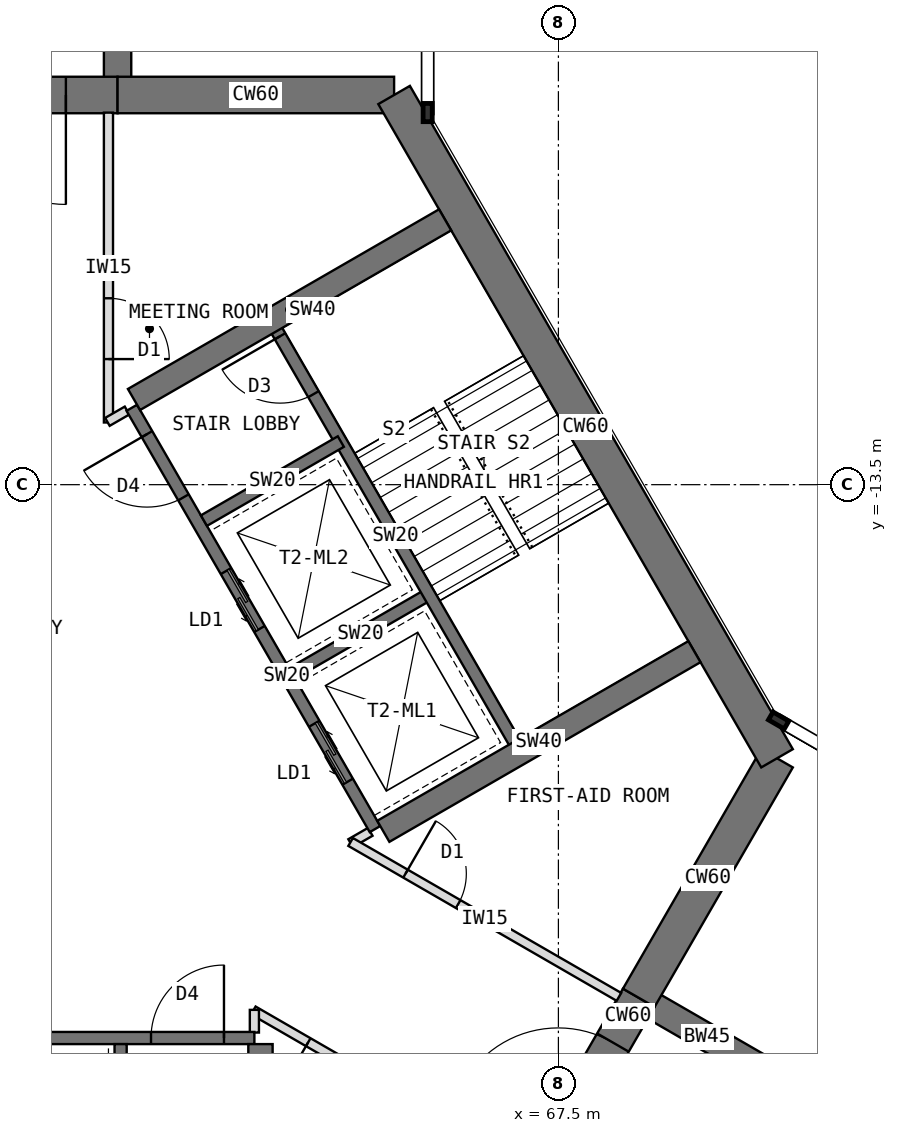
"""IFC4 building model, lengths in metres.
Left out: names, types, materials, properties, quantities, classifications, styles, units other than length and angle.
Written with IfcOpenShell. Run it as: python <this file> out.ifc"""

import sys

from ifc_helpers import new_model, si_unit, direction, frame, frame_2d, origin, place, context, subcontext, project, spatial, rectangle, extrude, element, fill, save


model = new_model("IFC4")
c1 = context("Model", 3, precision=1e-05, world=origin(), true_north=direction((0.0, 1.0)))
c2 = subcontext(c1, "Body", "Model", "MODEL_VIEW")
j1 = project(units=[si_unit("LENGTHUNIT", "METRE"), si_unit("PLANEANGLEUNIT", "RADIAN")], contexts=[c1])
p1 = place(None, origin())
s1 = spatial("IfcSite", under=j1, at=p1, CompositionType="ELEMENT")
p2 = place(p1, origin())
s2 = spatial("IfcBuilding", under=s1, at=p2, CompositionType="ELEMENT")
p3 = place(p2, frame((0.0, 0.0, 97.5)))
s3 = spatial("IfcBuildingStorey", under=s2, at=p3, CompositionType="ELEMENT", Elevation=97.5)
p4 = place(p3, frame((64.798, -7.092, 0.0), z_axis=(0.0, 0.0, 1.0), x_axis=(-1.0, 0.0, 0.0)))
e1 = element("IfcWall", 1, at=p4, inside=s3, PredefinedType="SHEAR", context=c2, shape_type="SweptSolid", body=[
    extrude(rectangle(XDim=4.548, YDim=0.6, at=frame_2d((2.274, 0.0))), origin(), (0.0, 0.0, 1.0), 4.0),
])
p5 = place(p3, frame((60.25, -7.092, 0.0), z_axis=(0.0, 0.0, 1.0), x_axis=(-1.0, 0.0, 0.0)))
e2 = element("IfcWall", 2, at=p5, inside=s3, PredefinedType="SHEAR", context=c2, shape_type="SweptSolid", body=[
    extrude(rectangle(XDim=3.5, YDim=0.6, at=frame_2d((1.75, 0.0))), origin(), (0.0, 0.0, 1.0), 4.0),
])
p6 = place(p5, frame((0.85, 0.0, 0.0)))
e3 = element("IfcOpeningElement", 3, at=p6, cuts=e2, PredefinedType="OPENING", context=c2, shape_type="SweptSolid", body=[
    extrude(rectangle(XDim=1.8, YDim=2.1, at=frame_2d((0.9, 1.05))), frame((0.0, 0.31, 0.0), z_axis=(0.0, -1.0, 0.0), x_axis=(1.0, 0.0, 0.0)), (0.0, 0.0, 1.0), 0.62),
])
p7 = place(p3, frame((67.072, -24.97, 0.0), z_axis=(0.0, 0.0, 1.0), x_axis=(0.500010275428, 0.866019471182, 0.0)))
e4 = element("IfcWall", 4, at=p7, inside=s3, PredefinedType="SHEAR", context=c2, shape_type="SweptSolid", body=[
    extrude(rectangle(XDim=3.5, YDim=0.6, at=frame_2d((1.75, 0.0))), origin(), (0.0, 0.0, 1.0), 4.0),
])
p8 = place(p7, frame((0.85, 0.0, 0.0)))
e5 = element("IfcOpeningElement", 5, at=p8, cuts=e4, PredefinedType="OPENING", context=c2, shape_type="SweptSolid", body=[
    extrude(rectangle(XDim=1.8, YDim=2.1, at=frame_2d((0.9, 1.05))), frame((0.0, 0.31, 0.0), z_axis=(0.0, -1.0, 0.0), x_axis=(1.0, 0.0, 0.0)), (0.0, 0.0, 1.0), 0.62),
])
p9 = place(p3, frame((68.822, -21.939, 0.0), z_axis=(0.0, 0.0, 1.0), x_axis=(0.500024481964, 0.866011268655, 0.0)))
e6 = element("IfcWall", 6, at=p9, inside=s3, PredefinedType="SHEAR", context=c2, shape_type="SweptSolid", body=[
    extrude(rectangle(XDim=4.548, YDim=0.6, at=frame_2d((2.274, 0.0))), origin(), (0.0, 0.0, 1.0), 4.0),
])
p10 = place(p3, frame((71.096, -18.0, 0.0), z_axis=(0.0, 0.0, 1.0), x_axis=(-0.500005998175, 0.866021940709, 0.0)))
e7 = element("IfcWall", 7, at=p10, inside=s3, PredefinedType="SHEAR", context=c2, shape_type="SweptSolid", body=[
    extrude(rectangle(XDim=12.596, YDim=0.6, at=frame_2d((6.298, 0.0))), origin(), (0.0, 0.0, 1.0), 4.0),
])
p11 = place(p3, frame((60.25, -7.092, 0.0), z_axis=(0.0, 0.0, 1.0), x_axis=(0.0, 1.0, 0.0)))
e8 = element("IfcWall", 8, at=p11, inside=s3, PredefinedType="SHEAR", context=c2, shape_type="SweptSolid", body=[
    extrude(rectangle(XDim=2.592, YDim=0.45, at=frame_2d((1.296, 0.0))), origin(), (0.0, 0.0, 1.0), 4.0),
])
p12 = place(p3, frame((68.822, -21.939, 0.0), z_axis=(0.0, 0.0, 1.0), x_axis=(0.866072649678, -0.499918158782, 0.0)))
e9 = element("IfcWall", 9, at=p12, inside=s3, PredefinedType="SHEAR", context=c2, shape_type="SweptSolid", body=[
    extrude(rectangle(XDim=2.592, YDim=0.45, at=frame_2d((1.296, 0.0))), origin(), (0.0, 0.0, 1.0), 4.0),
])
p13 = place(p3, frame((54.5, -22.6, 0.0), z_axis=(0.0, 0.0, 1.0), x_axis=(1.0, 0.0, 0.0)))
e10 = element("IfcWall", 10, at=p13, inside=s3, PredefinedType="SHEAR", context=c2, shape_type="SweptSolid", body=[
    extrude(rectangle(XDim=8.0, YDim=0.2, at=frame_2d((4.0, 0.0))), origin(), (0.0, 0.0, 1.0), 4.0),
])
p14 = place(p13, frame((6.3, 0.0, 0.0)))
e11 = element("IfcOpeningElement", 11, at=p14, cuts=e10, PredefinedType="OPENING", context=c2, shape_type="SweptSolid", body=[
    extrude(rectangle(XDim=1.2, YDim=2.1, at=frame_2d((0.6, 1.05))), frame((0.0, 0.11, 0.0), z_axis=(0.0, -1.0, 0.0), x_axis=(1.0, 0.0, 0.0)), (0.0, 0.0, 1.0), 0.22),
])
p15 = place(p13, frame((0.9, 0.0, 0.0)))
e12 = element("IfcOpeningElement", 12, at=p15, cuts=e10, PredefinedType="OPENING", context=c2, shape_type="SweptSolid", body=[
    extrude(rectangle(XDim=1.1, YDim=2.2, at=frame_2d((0.55, 1.1))), frame((0.0, 0.11, 0.0), z_axis=(0.0, -1.0, 0.0), x_axis=(1.0, 0.0, 0.0)), (0.0, 0.0, 1.0), 0.22),
])
p16 = place(p3, frame((60.3, -22.7, 0.0), z_axis=(0.0, 0.0, 1.0), x_axis=(0.0, -1.0, 0.0)))
e13 = element("IfcWall", 13, at=p16, inside=s3, PredefinedType="SHEAR", context=c2, shape_type="SweptSolid", body=[
    extrude(rectangle(XDim=2.6, YDim=0.2, at=frame_2d((1.3, 0.0))), origin(), (0.0, 0.0, 1.0), 4.0),
])
p17 = place(p16, frame((0.55, 0.0, 0.0)))
e14 = element("IfcOpeningElement", 14, at=p17, cuts=e13, PredefinedType="OPENING", context=c2, shape_type="SweptSolid", body=[
    extrude(rectangle(XDim=1.3, YDim=2.2, at=frame_2d((0.65, 1.1))), frame((0.0, 0.11, 0.0), z_axis=(0.0, -1.0, 0.0), x_axis=(1.0, 0.0, 0.0)), (0.0, 0.0, 1.0), 0.22),
])
p18 = place(p3, frame((62.6, -22.7, 0.0), z_axis=(0.0, 0.0, 1.0), x_axis=(0.0, -1.0, 0.0)))
e15 = element("IfcWall", 15, at=p18, inside=s3, PredefinedType="SHEAR", context=c2, shape_type="SweptSolid", body=[
    extrude(rectangle(XDim=5.908, YDim=0.4, at=frame_2d((2.954, 0.0))), origin(), (0.0, 0.0, 1.0), 4.0),
])
p19 = place(p3, frame((64.484, -19.164, 0.0), z_axis=(0.0, 0.0, 1.0), x_axis=(-0.49999894854, 0.866026010844, 0.0)))
e16 = element("IfcWall", 16, at=p19, inside=s3, PredefinedType="SHEAR", context=c2, shape_type="SweptSolid", body=[
    extrude(rectangle(XDim=8.0, YDim=0.2, at=frame_2d((4.0, 0.0))), origin(), (0.0, 0.0, 1.0), 4.0),
])
p20 = place(p19, frame((6.3, 0.0, 0.0)))
e17 = element("IfcOpeningElement", 17, at=p20, cuts=e16, PredefinedType="OPENING", context=c2, shape_type="SweptSolid", body=[
    extrude(rectangle(XDim=1.2, YDim=2.1, at=frame_2d((0.6, 1.05))), frame((0.0, 0.11, 0.0), z_axis=(0.0, -1.0, 0.0), x_axis=(1.0, 0.0, 0.0)), (0.0, 0.0, 1.0), 0.22),
])
p21 = place(p19, frame((0.9, 0.0, 0.0)))
e18 = element("IfcOpeningElement", 18, at=p21, cuts=e16, PredefinedType="OPENING", context=c2, shape_type="SweptSolid", body=[
    extrude(rectangle(XDim=1.1, YDim=2.2, at=frame_2d((0.55, 1.1))), frame((0.0, 0.11, 0.0), z_axis=(0.0, -1.0, 0.0), x_axis=(1.0, 0.0, 0.0)), (0.0, 0.0, 1.0), 0.22),
])
p22 = place(p19, frame((3.8, 0.0, 0.0)))
e19 = element("IfcOpeningElement", 19, at=p22, cuts=e16, PredefinedType="OPENING", context=c2, shape_type="SweptSolid", body=[
    extrude(rectangle(XDim=1.1, YDim=2.2, at=frame_2d((0.55, 1.1))), frame((0.0, 0.11, 0.0), z_axis=(0.0, -1.0, 0.0), x_axis=(1.0, 0.0, 0.0)), (0.0, 0.0, 1.0), 0.22),
])
p23 = place(p3, frame((63.12, -16.603, 0.0), z_axis=(0.0, 0.0, 1.0), x_axis=(0.866062058628, 0.499936506574, 0.0)))
e20 = element("IfcWall", 20, at=p23, inside=s3, PredefinedType="SHEAR", context=c2, shape_type="SweptSolid", body=[
    extrude(rectangle(XDim=2.6, YDim=0.2, at=frame_2d((1.3, 0.0))), origin(), (0.0, 0.0, 1.0), 4.0),
])
p24 = place(p3, frame((61.67, -14.091, 0.0), z_axis=(0.0, 0.0, 1.0), x_axis=(0.86603858612, 0.49997716683, 0.0)))
e21 = element("IfcWall", 21, at=p24, inside=s3, PredefinedType="SHEAR", context=c2, shape_type="SweptSolid", body=[
    extrude(rectangle(XDim=2.6, YDim=0.2, at=frame_2d((1.3, 0.0))), origin(), (0.0, 0.0, 1.0), 4.0),
])
p25 = place(p3, frame((66.822, -17.814, 0.0), z_axis=(0.0, 0.0, 1.0), x_axis=(-0.49999894854, 0.866026010844, 0.0)))
e22 = element("IfcWall", 22, at=p25, inside=s3, PredefinedType="SHEAR", context=c2, shape_type="SweptSolid", body=[
    extrude(rectangle(XDim=8.0, YDim=0.2, at=frame_2d((4.0, 0.0))), origin(), (0.0, 0.0, 1.0), 4.0),
])
p26 = place(p25, frame((6.7, 0.0, 0.0)))
e23 = element("IfcOpeningElement", 23, at=p26, cuts=e22, PredefinedType="OPENING", context=c2, shape_type="SweptSolid", body=[
    extrude(rectangle(XDim=1.1, YDim=2.1, at=frame_2d((0.55, 1.05))), frame((0.0, 0.11, 0.0), z_axis=(0.0, -1.0, 0.0), x_axis=(1.0, 0.0, 0.0)), (0.0, 0.0, 1.0), 0.22),
])
p27 = place(p3, frame((60.52, -12.099, 0.0), z_axis=(0.0, 0.0, 1.0), x_axis=(0.866009424208, 0.500027676417, 0.0)))
e24 = element("IfcWall", 24, at=p27, inside=s3, PredefinedType="SHEAR", context=c2, shape_type="SweptSolid", body=[
    extrude(rectangle(XDim=5.908, YDim=0.4, at=frame_2d((2.954, 0.0))), origin(), (0.0, 0.0, 1.0), 4.0),
])
p28 = place(p3, frame((64.62, -19.201, 0.0), z_axis=(0.0, 0.0, 1.0), x_axis=(0.866027317282, 0.49999668571, 0.0)))
e25 = element("IfcWall", 25, at=p28, inside=s3, PredefinedType="SHEAR", context=c2, shape_type="SweptSolid", body=[
    extrude(rectangle(XDim=5.908, YDim=0.4, at=frame_2d((2.954, 0.0))), origin(), (0.0, 0.0, 1.0), 4.0),
])
p29 = place(p3, frame((60.1, -7.382, 0.0), z_axis=(0.0, 0.0, 1.0), x_axis=(0.0, -1.0, 0.0)))
e26 = element("IfcWall", 26, at=p29, inside=s3, PredefinedType="PARTITIONING", context=c2, shape_type="SweptSolid", body=[
    extrude(rectangle(XDim=5.096, YDim=0.15, at=frame_2d((2.548, 0.0))), origin(), (0.0, 0.0, 1.0), 3.8),
])
p30 = place(p29, frame((3.053, 0.0, 0.0)))
e27 = element("IfcOpeningElement", 27, at=p30, cuts=e26, PredefinedType="OPENING", context=c2, shape_type="SweptSolid", body=[
    extrude(rectangle(XDim=1.0, YDim=2.1, at=frame_2d((0.5, 1.05))), frame((0.0, 0.085, 0.0), z_axis=(0.0, -1.0, 0.0), x_axis=(1.0, 0.0, 0.0)), (0.0, 0.0, 1.0), 0.17),
])
p31 = place(p3, frame((60.083, -12.467, 0.0), z_axis=(0.0, 0.0, 1.0), x_axis=(0.866261881104, 0.499590185398, 0.0)))
e28 = element("IfcWall", 28, at=p31, inside=s3, PredefinedType="PARTITIONING", context=c2, shape_type="SweptSolid", body=[
    extrude(rectangle(XDim=0.373, YDim=0.15, at=frame_2d((0.187, 0.0))), origin(), (0.0, 0.0, 1.0), 3.8),
])
p32 = place(p3, frame((64.406, -19.209, 0.0), z_axis=(0.0, 0.0, 1.0), x_axis=(-0.865978465477, -0.500081290722, 0.0)))
e29 = element("IfcWall", 29, at=p32, inside=s3, PredefinedType="PARTITIONING", context=c2, shape_type="SweptSolid", body=[
    extrude(rectangle(XDim=0.373, YDim=0.15, at=frame_2d((0.187, 0.0))), origin(), (0.0, 0.0, 1.0), 3.8),
])
p33 = place(p3, frame((64.083, -19.375, 0.0), z_axis=(0.0, 0.0, 1.0), x_axis=(0.865996484538, -0.500050086259, 0.0)))
e30 = element("IfcWall", 30, at=p33, inside=s3, PredefinedType="PARTITIONING", context=c2, shape_type="SweptSolid", body=[
    extrude(rectangle(XDim=5.096, YDim=0.15, at=frame_2d((2.548, 0.0))), origin(), (0.0, 0.0, 1.0), 3.8),
])
p34 = place(p33, frame((1.043, 0.0, 0.0)))
e31 = element("IfcOpeningElement", 31, at=p34, cuts=e30, PredefinedType="OPENING", context=c2, shape_type="SweptSolid", body=[
    extrude(rectangle(XDim=1.0, YDim=2.1, at=frame_2d((0.5, 1.05))), frame((0.0, 0.085, 0.0), z_axis=(0.0, -1.0, 0.0), x_axis=(1.0, 0.0, 0.0)), (0.0, 0.0, 1.0), 0.17),
])
p35 = place(p3, frame((66.896, -24.695, 0.0), z_axis=(0.0, 0.0, 1.0), x_axis=(-0.866029209911, 0.499993407537, 0.0)))
e32 = element("IfcWall", 32, at=p35, inside=s3, PredefinedType="PARTITIONING", context=c2, shape_type="SweptSolid", body=[
    extrude(rectangle(XDim=5.096, YDim=0.15, at=frame_2d((2.548, 0.0))), origin(), (0.0, 0.0, 1.0), 3.8),
])
p36 = place(p35, frame((3.053, 0.0, 0.0)))
e33 = element("IfcOpeningElement", 33, at=p36, cuts=e32, PredefinedType="OPENING", context=c2, shape_type="SweptSolid", body=[
    extrude(rectangle(XDim=1.0, YDim=2.1, at=frame_2d((0.5, 1.05))), frame((0.0, 0.085, 0.0), z_axis=(0.0, -1.0, 0.0), x_axis=(1.0, 0.0, 0.0)), (0.0, 0.0, 1.0), 0.17),
])
p37 = place(p3, frame((62.5, -22.137, 0.0), z_axis=(0.0, 0.0, 1.0), x_axis=(0.0, -1.0, 0.0)))
e34 = element("IfcWall", 34, at=p37, inside=s3, PredefinedType="PARTITIONING", context=c2, shape_type="SweptSolid", body=[
    extrude(rectangle(XDim=0.373, YDim=0.15, at=frame_2d((0.187, 0.0))), origin(), (0.0, 0.0, 1.0), 3.8),
])
p38 = place(p14, origin())
e35 = element("IfcDoor", 35, at=p38, inside=s3, OperationType="SINGLE_SWING_RIGHT", PredefinedType="DOOR", context=c2, shape_type="SweptSolid", body=[
    extrude(rectangle(XDim=1.2, YDim=2.1, at=frame_2d((0.6, 1.05))), frame((0.0, 0.025, 0.0), z_axis=(0.0, -1.0, 0.0), x_axis=(1.0, 0.0, 0.0)), (0.0, 0.0, 1.0), 0.05),
])
fill(e11, e35)
p39 = place(p20, origin())
e36 = element("IfcDoor", 36, at=p39, inside=s3, OperationType="SINGLE_SWING_RIGHT", PredefinedType="DOOR", context=c2, shape_type="SweptSolid", body=[
    extrude(rectangle(XDim=1.2, YDim=2.1, at=frame_2d((0.6, 1.05))), frame((0.0, 0.025, 0.0), z_axis=(0.0, -1.0, 0.0), x_axis=(1.0, 0.0, 0.0)), (0.0, 0.0, 1.0), 0.05),
])
fill(e17, e36)
p40 = place(p21, origin())
e37 = element("IfcDoor", 37, at=p40, inside=s3, OperationType="DOUBLE_DOOR_SLIDING", PredefinedType="DOOR", context=c2, shape_type="SweptSolid", body=[
    extrude(rectangle(XDim=1.1, YDim=2.2, at=frame_2d((0.55, 1.1))), frame((0.0, 0.025, 0.0), z_axis=(0.0, -1.0, 0.0), x_axis=(1.0, 0.0, 0.0)), (0.0, 0.0, 1.0), 0.05),
])
fill(e18, e37)
p41 = place(p22, origin())
e38 = element("IfcDoor", 38, at=p41, inside=s3, OperationType="DOUBLE_DOOR_SLIDING", PredefinedType="DOOR", context=c2, shape_type="SweptSolid", body=[
    extrude(rectangle(XDim=1.1, YDim=2.2, at=frame_2d((0.55, 1.1))), frame((0.0, 0.025, 0.0), z_axis=(0.0, -1.0, 0.0), x_axis=(1.0, 0.0, 0.0)), (0.0, 0.0, 1.0), 0.05),
])
fill(e19, e38)
p42 = place(p26, origin())
e39 = element("IfcDoor", 39, at=p42, inside=s3, OperationType="SINGLE_SWING_RIGHT", PredefinedType="DOOR", context=c2, shape_type="SweptSolid", body=[
    extrude(rectangle(XDim=1.1, YDim=2.1, at=frame_2d((0.55, 1.05))), frame((0.0, 0.025, 0.0), z_axis=(0.0, -1.0, 0.0), x_axis=(1.0, 0.0, 0.0)), (0.0, 0.0, 1.0), 0.05),
])
fill(e23, e39)
p43 = place(p6, origin())
e40 = element("IfcDoor", 40, at=p43, inside=s3, OperationType="DOUBLE_DOOR_DOUBLE_SWING", PredefinedType="DOOR", context=c2, shape_type="SweptSolid", body=[
    extrude(rectangle(XDim=1.72, YDim=2.06, at=frame_2d((0.9, 1.03))), frame((0.0, 0.025, 0.0), z_axis=(0.0, -1.0, 0.0), x_axis=(1.0, 0.0, 0.0)), (0.0, 0.0, 1.0), 0.05),
    extrude(rectangle(XDim=0.04, YDim=2.1, at=frame_2d((0.02, 1.05))), frame((0.0, 0.3, 0.0), z_axis=(0.0, -1.0, 0.0), x_axis=(1.0, 0.0, 0.0)), (0.0, 0.0, 1.0), 0.6),
    extrude(rectangle(XDim=0.04, YDim=2.1, at=frame_2d((1.78, 1.05))), frame((0.0, 0.3, 0.0), z_axis=(0.0, -1.0, 0.0), x_axis=(1.0, 0.0, 0.0)), (0.0, 0.0, 1.0), 0.6),
    extrude(rectangle(XDim=1.72, YDim=0.04, at=frame_2d((0.9, 2.08))), frame((0.0, 0.3, 0.0), z_axis=(0.0, -1.0, 0.0), x_axis=(1.0, 0.0, 0.0)), (0.0, 0.0, 1.0), 0.6),
])
fill(e3, e40)
p44 = place(p8, origin())
e41 = element("IfcDoor", 41, at=p44, inside=s3, OperationType="DOUBLE_DOOR_DOUBLE_SWING", PredefinedType="DOOR", context=c2, shape_type="SweptSolid", body=[
    extrude(rectangle(XDim=1.72, YDim=2.06, at=frame_2d((0.9, 1.03))), frame((0.0, 0.025, 0.0), z_axis=(0.0, -1.0, 0.0), x_axis=(1.0, 0.0, 0.0)), (0.0, 0.0, 1.0), 0.05),
    extrude(rectangle(XDim=0.04, YDim=2.1, at=frame_2d((0.02, 1.05))), frame((0.0, 0.3, 0.0), z_axis=(0.0, -1.0, 0.0), x_axis=(1.0, 0.0, 0.0)), (0.0, 0.0, 1.0), 0.6),
    extrude(rectangle(XDim=0.04, YDim=2.1, at=frame_2d((1.78, 1.05))), frame((0.0, 0.3, 0.0), z_axis=(0.0, -1.0, 0.0), x_axis=(1.0, 0.0, 0.0)), (0.0, 0.0, 1.0), 0.6),
    extrude(rectangle(XDim=1.72, YDim=0.04, at=frame_2d((0.9, 2.08))), frame((0.0, 0.3, 0.0), z_axis=(0.0, -1.0, 0.0), x_axis=(1.0, 0.0, 0.0)), (0.0, 0.0, 1.0), 0.6),
])
fill(e5, e41)
p45 = place(p36, origin())
e42 = element("IfcDoor", 42, at=p45, inside=s3, OperationType="SINGLE_SWING_RIGHT", PredefinedType="DOOR", context=c2, shape_type="SweptSolid", body=[
    extrude(rectangle(XDim=1.0, YDim=2.1, at=frame_2d((0.5, 1.05))), frame((0.0, 0.025, 0.0), z_axis=(0.0, -1.0, 0.0), x_axis=(1.0, 0.0, 0.0)), (0.0, 0.0, 1.0), 0.05),
])
fill(e33, e42)
p46 = place(p34, origin())
e43 = element("IfcDoor", 43, at=p46, inside=s3, OperationType="SINGLE_SWING_LEFT", PredefinedType="DOOR", context=c2, shape_type="SweptSolid", body=[
    extrude(rectangle(XDim=1.0, YDim=2.1, at=frame_2d((0.5, 1.05))), frame((0.0, 0.025, 0.0), z_axis=(0.0, -1.0, 0.0), x_axis=(1.0, 0.0, 0.0)), (0.0, 0.0, 1.0), 0.05),
])
fill(e31, e43)
p47 = place(p30, origin())
e44 = element("IfcDoor", 44, at=p47, inside=s3, OperationType="SINGLE_SWING_RIGHT", PredefinedType="DOOR", context=c2, shape_type="SweptSolid", body=[
    extrude(rectangle(XDim=1.0, YDim=2.1, at=frame_2d((0.5, 1.05))), frame((0.0, 0.025, 0.0), z_axis=(0.0, -1.0, 0.0), x_axis=(1.0, 0.0, 0.0)), (0.0, 0.0, 1.0), 0.05),
])
fill(e27, e44)
save(model, sys.argv[1])
